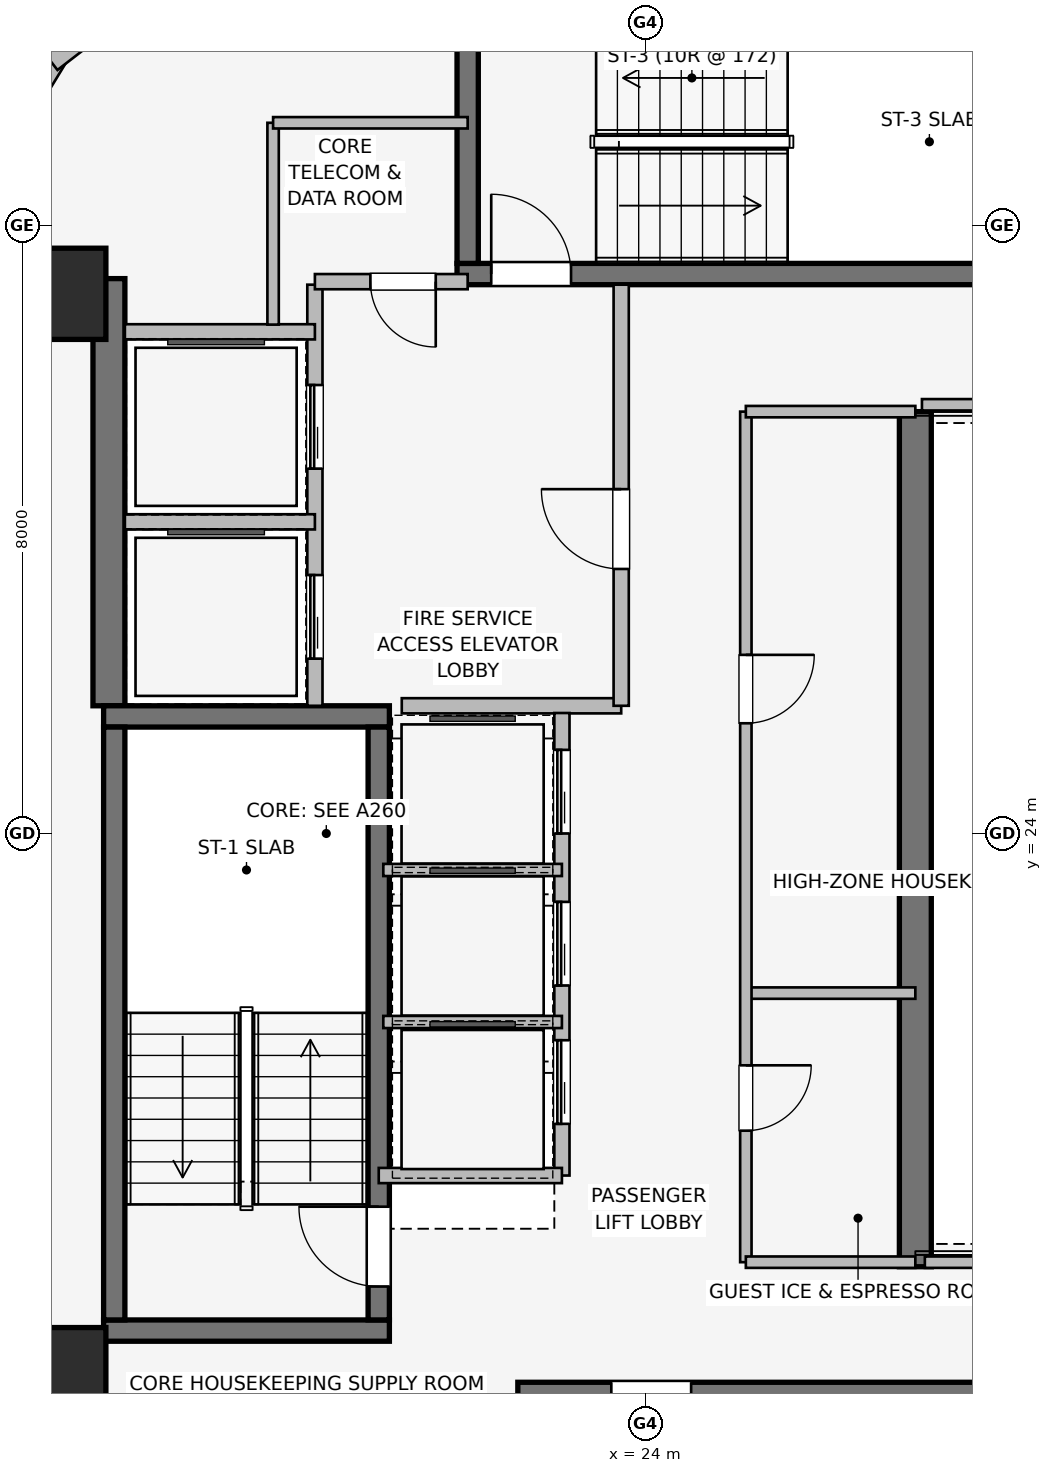
"""IFC4 building model, lengths in metres.
Left out: names, types, materials, properties, quantities, classifications, styles, units other than length and angle.
Written with IfcOpenShell. Run it as: python <this file> out.ifc"""

import sys

from ifc_helpers import new_model, si_unit, direction, frame, frame_2d, origin, origin_2d, place, context, subcontext, project, spatial, rectangle, extrude, element, fill, save


model = new_model("IFC4")
c1 = context("Model", 3, precision=1e-05, world=origin(), true_north=direction((0.0, 1.0)))
c2 = subcontext(c1, "Body", "Model", "MODEL_VIEW")
j1 = project(units=[si_unit("LENGTHUNIT", "METRE"), si_unit("PLANEANGLEUNIT", "RADIAN")], contexts=[c1])
p1 = place(None, origin())
s1 = spatial("IfcSite", under=j1, at=p1, CompositionType="ELEMENT")
p2 = place(p1, origin())
s2 = spatial("IfcBuilding", under=s1, at=p2, CompositionType="ELEMENT")
p3 = place(p2, frame((0.0, 0.0, 213.7)))
s3 = spatial("IfcBuildingStorey", under=s2, at=p3, CompositionType="ELEMENT", Elevation=213.7)
p4 = place(p3, frame((16.94, 25.68, 0.0), z_axis=(0.0, 0.0, 1.0), x_axis=(0.0, 1.0, 0.0)))
e1 = element("IfcWall", 1, at=p4, inside=s3, PredefinedType="SHEAR", context=c2, shape_type="SweptSolid", body=[
    extrude(rectangle(XDim=5.62, YDim=0.42, at=frame_2d((2.81, 0.0))), origin(), (0.0, 0.0, 1.0), 3.45),
])
p5 = place(p3, frame((27.55, 29.55, 0.0), z_axis=(0.0, 0.0, 1.0), x_axis=(0.0, -1.0, 0.0)))
e2 = element("IfcWall", 2, at=p5, inside=s3, PredefinedType="SHEAR", context=c2, shape_type="SweptSolid", body=[
    extrude(rectangle(XDim=11.25, YDim=0.42, at=frame_2d((5.625, 0.0))), origin(), (0.0, 0.0, 1.0), 3.45),
])
for number, where, z_axis, x_axis in (
    (3, (16.87, 17.46, 0.0), (0.0, 0.0, 1.0), (1.0, 0.0, 0.0)),
    (4, (20.63, 25.54, 0.0), (0.0, 0.0, 1.0), (-1.0, 0.0, 0.0)),
):
    element("IfcWall", number, at=place(p3, frame(where, z_axis=z_axis, x_axis=x_axis)), inside=s3, PredefinedType="SHEAR", context=c2, shape_type="SweptSolid", body=[
        extrude(rectangle(XDim=3.76, YDim=0.28, at=frame_2d((1.88, 0.0))), origin(), (0.0, 0.0, 1.0), 3.45),
    ])
p6 = place(p3, frame((17.01, 25.4, 0.0), z_axis=(0.0, 0.0, 1.0), x_axis=(0.0, -1.0, 0.0)))
e5 = element("IfcWall", 5, at=p6, inside=s3, PredefinedType="SHEAR", context=c2, shape_type="SweptSolid", body=[
    extrude(rectangle(XDim=7.8, YDim=0.28, at=frame_2d((3.9, 0.0))), origin(), (0.0, 0.0, 1.0), 3.45),
])
p7 = place(p3, frame((20.49, 17.6, 0.0), z_axis=(0.0, 0.0, 1.0), x_axis=(0.0, 1.0, 0.0)))
e6 = element("IfcWall", 6, at=p7, inside=s3, PredefinedType="SHEAR", context=c2, shape_type="SweptSolid", body=[
    extrude(rectangle(XDim=7.8, YDim=0.28, at=frame_2d((3.9, 0.0))), origin(), (0.0, 0.0, 1.0), 3.45),
])
p8 = place(p7, frame((0.44, 0.0, 0.0)))
e7 = element("IfcOpeningElement", 7, at=p8, cuts=e6, PredefinedType="OPENING", context=c2, shape_type="SweptSolid", body=[
    extrude(rectangle(XDim=1.05, YDim=2.0, at=frame_2d((0.525, 1.0))), frame((0.0, 0.15, 0.0), z_axis=(0.0, -1.0, 0.0), x_axis=(1.0, 0.0, 0.0)), (0.0, 0.0, 1.0), 0.3),
])
p9 = place(p3, frame((30.68, 16.64, 0.0), z_axis=(0.0, 0.0, 1.0), x_axis=(-1.0, 0.0, 0.0)))
e8 = element("IfcWall", 8, at=p9, inside=s3, PredefinedType="SHEAR", context=c2, shape_type="SweptSolid", body=[
    extrude(rectangle(XDim=8.36, YDim=0.28, at=frame_2d((4.18, 0.0))), origin(), (0.0, 0.0, 1.0), 3.45),
])
p10 = place(p9, frame((6.08, 0.0, 0.0)))
e9 = element("IfcOpeningElement", 9, at=p10, cuts=e8, PredefinedType="OPENING", context=c2, shape_type="SweptSolid", body=[
    extrude(rectangle(XDim=1.05, YDim=2.0, at=frame_2d((0.525, 1.0))), frame((0.0, 0.15, 0.0), z_axis=(0.0, -1.0, 0.0), x_axis=(1.0, 0.0, 0.0)), (0.0, 0.0, 1.0), 0.3),
])
p11 = place(p3, frame((21.52, 31.36, 0.0), z_axis=(0.0, 0.0, 1.0), x_axis=(1.0, 0.0, 0.0)))
e10 = element("IfcWall", 10, at=p11, inside=s3, PredefinedType="SHEAR", context=c2, shape_type="SweptSolid", body=[
    extrude(rectangle(XDim=8.36, YDim=0.28, at=frame_2d((4.18, 0.0))), origin(), (0.0, 0.0, 1.0), 3.45),
])
p12 = place(p11, frame((0.45, 0.0, 0.0)))
e11 = element("IfcOpeningElement", 11, at=p12, cuts=e10, PredefinedType="OPENING", context=c2, shape_type="SweptSolid", body=[
    extrude(rectangle(XDim=1.05, YDim=2.0, at=frame_2d((0.525, 1.0))), frame((0.0, 0.15, 0.0), z_axis=(0.0, -1.0, 0.0), x_axis=(1.0, 0.0, 0.0)), (0.0, 0.0, 1.0), 0.3),
])
p13 = place(p3, frame((21.66, 34.7, 0.0), z_axis=(0.0, 0.0, 1.0), x_axis=(0.0, -1.0, 0.0)))
e12 = element("IfcWall", 12, at=p13, inside=s3, PredefinedType="SHEAR", context=c2, shape_type="SweptSolid", body=[
    extrude(rectangle(XDim=3.2, YDim=0.28, at=frame_2d((1.6, 0.0))), origin(), (0.0, 0.0, 1.0), 3.45),
])
for number, where, z_axis, x_axis in (
    (13, (16.3, 16.9, 0.0), (0.0, 0.0, 1.0), (1.0, 0.0, 0.0)),
    (14, (16.3, 31.1, 0.0), (0.0, 0.0, 1.0), (1.0, 0.0, 0.0)),
):
    element("IfcColumn", number, at=place(p3, frame(where, z_axis=z_axis, x_axis=x_axis)), inside=s3, PredefinedType="COLUMN", context=c2, shape_type="SweptSolid", body=[
        extrude(rectangle(XDim=1.2, YDim=1.2, at=origin_2d()), origin(), (0.0, 0.0, 1.0), 3.45),
    ])
p14 = place(p3, frame((15.415, 32.882, 0.0), z_axis=(0.0, 0.0, 1.0), x_axis=(0.520325409202, 0.853968072318, 0.0)))
e15 = element("IfcWall", 15, at=p14, inside=s3, PredefinedType="STANDARD", context=c2, shape_type="SweptSolid", body=[
    extrude(rectangle(XDim=1.678, YDim=0.33, at=frame_2d((0.839, 0.0))), origin(), (0.0, 0.0, 1.0), 3.19),
])
p15 = place(p3, frame((16.162, 34.175, 0.0), z_axis=(0.0, 0.0, 1.0), x_axis=(0.791409877269, 0.611285862884, 0.0)))
e16 = element("IfcWall", 16, at=p15, inside=s3, PredefinedType="STANDARD", context=c2, shape_type="SweptSolid", body=[
    extrude(rectangle(XDim=1.677, YDim=0.33, at=frame_2d((0.838, 0.0))), origin(), (0.0, 0.0, 1.0), 3.19),
])
p16 = place(p3, frame((19.65, 25.68, 0.0), z_axis=(0.0, 0.0, 1.0), x_axis=(0.0, 1.0, 0.0)))
e17 = element("IfcWall", 17, at=p16, inside=s3, PredefinedType="PARTITIONING", context=c2, shape_type="SweptSolid", body=[
    extrude(rectangle(XDim=5.54, YDim=0.2, at=frame_2d((2.77, 0.0))), origin(), (0.0, 0.0, 1.0), 3.19),
])
p17 = place(p16, frame((0.62, 0.0, 0.0)))
e18 = element("IfcOpeningElement", 18, at=p17, cuts=e17, PredefinedType="OPENING", context=c2, shape_type="SweptSolid", body=[
    extrude(rectangle(XDim=1.1, YDim=2.2, at=frame_2d((0.55, 1.1))), frame((0.0, 0.11, 0.0), z_axis=(0.0, -1.0, 0.0), x_axis=(1.0, 0.0, 0.0)), (0.0, 0.0, 1.0), 0.22),
])
p18 = place(p16, frame((3.12, 0.0, 0.0)))
e19 = element("IfcOpeningElement", 19, at=p18, cuts=e17, PredefinedType="OPENING", context=c2, shape_type="SweptSolid", body=[
    extrude(rectangle(XDim=1.1, YDim=2.2, at=frame_2d((0.55, 1.1))), frame((0.0, 0.11, 0.0), z_axis=(0.0, -1.0, 0.0), x_axis=(1.0, 0.0, 0.0)), (0.0, 0.0, 1.0), 0.22),
])
p19 = place(p3, frame((20.793, 25.68, 0.0), z_axis=(0.0, 0.0, 1.0), x_axis=(1.0, 0.0, 0.0)))
e20 = element("IfcWall", 20, at=p19, inside=s3, PredefinedType="PARTITIONING", context=c2, shape_type="SweptSolid", body=[
    extrude(rectangle(XDim=2.887, YDim=0.2, at=frame_2d((1.443, 0.0))), origin(), (0.0, 0.0, 1.0), 3.19),
])
p20 = place(p3, frame((23.68, 25.68, 0.0), z_axis=(0.0, 0.0, 1.0), x_axis=(0.0, 1.0, 0.0)))
e21 = element("IfcWall", 21, at=p20, inside=s3, PredefinedType="PARTITIONING", context=c2, shape_type="SweptSolid", body=[
    extrude(rectangle(XDim=5.54, YDim=0.2, at=frame_2d((2.77, 0.0))), origin(), (0.0, 0.0, 1.0), 3.19),
])
p21 = place(p20, frame((1.8, 0.0, 0.0)))
e22 = element("IfcOpeningElement", 22, at=p21, cuts=e21, PredefinedType="OPENING", context=c2, shape_type="SweptSolid", body=[
    extrude(rectangle(XDim=1.05, YDim=2.0, at=frame_2d((0.525, 1.0))), frame((0.0, 0.11, 0.0), z_axis=(0.0, -1.0, 0.0), x_axis=(1.0, 0.0, 0.0)), (0.0, 0.0, 1.0), 0.22),
])
p22 = place(p3, frame((21.66, 31.26, 0.0), z_axis=(0.0, 0.0, 1.0), x_axis=(-1.0, 0.0, 0.0)))
e23 = element("IfcWall", 23, at=p22, inside=s3, PredefinedType="PARTITIONING", context=c2, shape_type="SweptSolid", body=[
    extrude(rectangle(XDim=2.01, YDim=0.2, at=frame_2d((1.005, 0.0))), origin(), (0.0, 0.0, 1.0), 3.19),
])
p23 = place(p22, frame((0.42, 0.0, 0.0)))
e24 = element("IfcOpeningElement", 24, at=p23, cuts=e23, PredefinedType="OPENING", context=c2, shape_type="SweptSolid", body=[
    extrude(rectangle(XDim=0.86, YDim=2.0, at=frame_2d((0.43, 1.0))), frame((0.0, 0.11, 0.0), z_axis=(0.0, -1.0, 0.0), x_axis=(1.0, 0.0, 0.0)), (0.0, 0.0, 1.0), 0.22),
])
p24 = place(p3, frame((17.15, 28.1, 0.0), z_axis=(0.0, 0.0, 1.0), x_axis=(1.0, 0.0, 0.0)))
e25 = element("IfcWall", 25, at=p24, inside=s3, PredefinedType="PARTITIONING", context=c2, shape_type="SweptSolid", body=[
    extrude(rectangle(XDim=2.5, YDim=0.2, at=frame_2d((1.25, 0.0))), origin(), (0.0, 0.0, 1.0), 3.19),
])
p25 = place(p3, frame((19.65, 30.6, 0.0), z_axis=(0.0, 0.0, 1.0), x_axis=(-1.0, 0.0, 0.0)))
e26 = element("IfcWall", 26, at=p25, inside=s3, PredefinedType="PARTITIONING", context=c2, shape_type="SweptSolid", body=[
    extrude(rectangle(XDim=2.5, YDim=0.2, at=frame_2d((1.25, 0.0))), origin(), (0.0, 0.0, 1.0), 2.09),
])
p26 = place(p3, frame((22.9, 19.5, 0.0), z_axis=(0.0, 0.0, 1.0), x_axis=(0.0, 1.0, 0.0)))
e27 = element("IfcWall", 27, at=p26, inside=s3, PredefinedType="PARTITIONING", context=c2, shape_type="SweptSolid", body=[
    extrude(rectangle(XDim=6.085, YDim=0.2, at=frame_2d((3.042, 0.0))), origin(), (0.0, 0.0, 1.0), 3.19),
])
p27 = place(p26, frame((0.68, 0.0, 0.0)))
e28 = element("IfcOpeningElement", 28, at=p27, cuts=e27, PredefinedType="OPENING", context=c2, shape_type="SweptSolid", body=[
    extrude(rectangle(XDim=1.1, YDim=2.2, at=frame_2d((0.55, 1.1))), frame((0.0, 0.11, 0.0), z_axis=(0.0, -1.0, 0.0), x_axis=(1.0, 0.0, 0.0)), (0.0, 0.0, 1.0), 0.22),
])
p28 = place(p26, frame((2.5, 0.0, 0.0)))
e29 = element("IfcOpeningElement", 29, at=p28, cuts=e27, PredefinedType="OPENING", context=c2, shape_type="SweptSolid", body=[
    extrude(rectangle(XDim=1.1, YDim=2.2, at=frame_2d((0.55, 1.1))), frame((0.0, 0.11, 0.0), z_axis=(0.0, -1.0, 0.0), x_axis=(1.0, 0.0, 0.0)), (0.0, 0.0, 1.0), 0.22),
])
p29 = place(p26, frame((4.5, 0.0, 0.0)))
e30 = element("IfcOpeningElement", 30, at=p29, cuts=e27, PredefinedType="OPENING", context=c2, shape_type="SweptSolid", body=[
    extrude(rectangle(XDim=1.1, YDim=2.2, at=frame_2d((0.55, 1.1))), frame((0.0, 0.11, 0.0), z_axis=(0.0, -1.0, 0.0), x_axis=(1.0, 0.0, 0.0)), (0.0, 0.0, 1.0), 0.22),
])
p30 = place(p3, frame((20.49, 19.5, 0.0), z_axis=(0.0, 0.0, 1.0), x_axis=(1.0, 0.0, 0.0)))
e31 = element("IfcWall", 31, at=p30, inside=s3, PredefinedType="PARTITIONING", context=c2, shape_type="SweptSolid", body=[
    extrude(rectangle(XDim=2.41, YDim=0.2, at=frame_2d((1.205, 0.0))), origin(), (0.0, 0.0, 1.0), 2.09),
])
for number, where, z_axis, x_axis in (
    (32, (20.55, 21.52, 0.0), (0.0, 0.0, 1.0), (1.0, 0.0, 0.0)),
    (33, (20.55, 23.52, 0.0), (0.0, 0.0, 1.0), (1.0, 0.0, 0.0)),
):
    element("IfcWall", number, at=place(p3, frame(where, z_axis=z_axis, x_axis=x_axis)), inside=s3, PredefinedType="PARTITIONING", context=c2, shape_type="SweptSolid", body=[
        extrude(rectangle(XDim=2.35, YDim=0.16, at=frame_2d((1.175, 0.0))), origin(), (0.0, 0.0, 1.0), 3.19),
    ])
p31 = place(p3, frame((25.32, 21.9, 0.0), z_axis=(0.0, 0.0, 1.0), x_axis=(1.0, 0.0, 0.0)))
e34 = element("IfcWall", 34, at=p31, inside=s3, PredefinedType="PARTITIONING", context=c2, shape_type="SweptSolid", body=[
    extrude(rectangle(XDim=2.23, YDim=0.15, at=frame_2d((1.115, 0.0))), origin(), (0.0, 0.0, 1.0), 3.19),
])
p32 = place(p3, frame((25.32, 29.55, 0.0), z_axis=(0.0, 0.0, 1.0), x_axis=(0.0, -1.0, 0.0)))
e35 = element("IfcWall", 35, at=p32, inside=s3, PredefinedType="PARTITIONING", context=c2, shape_type="SweptSolid", body=[
    extrude(rectangle(XDim=11.19, YDim=0.15, at=frame_2d((5.595, 0.0))), origin(), (0.0, 0.0, 1.0), 3.19),
])
p33 = place(p32, frame((3.2, 0.0, 0.0)))
e36 = element("IfcOpeningElement", 36, at=p33, cuts=e35, PredefinedType="OPENING", context=c2, shape_type="SweptSolid", body=[
    extrude(rectangle(XDim=0.9, YDim=2.0, at=frame_2d((0.45, 1.0))), frame((0.0, 0.085, 0.0), z_axis=(0.0, -1.0, 0.0), x_axis=(1.0, 0.0, 0.0)), (0.0, 0.0, 1.0), 0.17),
])
p34 = place(p32, frame((8.6, 0.0, 0.0)))
e37 = element("IfcOpeningElement", 37, at=p34, cuts=e35, PredefinedType="OPENING", context=c2, shape_type="SweptSolid", body=[
    extrude(rectangle(XDim=0.86, YDim=2.0, at=frame_2d((0.43, 1.0))), frame((0.0, 0.085, 0.0), z_axis=(0.0, -1.0, 0.0), x_axis=(1.0, 0.0, 0.0)), (0.0, 0.0, 1.0), 0.17),
])
p35 = place(p3, frame((25.32, 18.36, 0.0), z_axis=(0.0, 0.0, 1.0), x_axis=(1.0, 0.0, 0.0)))
e38 = element("IfcWall", 38, at=p35, inside=s3, PredefinedType="PARTITIONING", context=c2, shape_type="SweptSolid", body=[
    extrude(rectangle(XDim=2.23, YDim=0.15, at=frame_2d((1.115, 0.0))), origin(), (0.0, 0.0, 1.0), 3.19),
])
p36 = place(p3, frame((27.55, 29.55, 0.0), z_axis=(0.0, 0.0, 1.0), x_axis=(-1.0, 0.0, 0.0)))
e39 = element("IfcWall", 39, at=p36, inside=s3, PredefinedType="PARTITIONING", context=c2, shape_type="SweptSolid", body=[
    extrude(rectangle(XDim=2.23, YDim=0.15, at=frame_2d((1.115, 0.0))), origin(), (0.0, 0.0, 1.0), 2.09),
])
p37 = place(p3, frame((19.1, 33.35, 0.0), z_axis=(0.0, 0.0, 1.0), x_axis=(0.0, -1.0, 0.0)))
e40 = element("IfcWall", 40, at=p37, inside=s3, PredefinedType="PARTITIONING", context=c2, shape_type="SweptSolid", body=[
    extrude(rectangle(XDim=2.655, YDim=0.15, at=frame_2d((1.328, 0.0))), origin(), (0.0, 0.0, 1.0), 3.19),
])
p38 = place(p3, frame((21.66, 33.35, 0.0), z_axis=(0.0, 0.0, 1.0), x_axis=(-1.0, 0.0, 0.0)))
e41 = element("IfcWall", 41, at=p38, inside=s3, PredefinedType="PARTITIONING", context=c2, shape_type="SweptSolid", body=[
    extrude(rectangle(XDim=2.56, YDim=0.15, at=frame_2d((1.28, 0.0))), origin(), (0.0, 0.0, 1.0), 3.19),
])
p39 = place(p3, frame((27.675, 18.36, 0.0), z_axis=(0.0, 0.0, 1.0), x_axis=(1.0, 0.0, 0.0)))
e42 = element("IfcWall", 42, at=p39, inside=s3, PredefinedType="PARTITIONING", context=c2, shape_type="SweptSolid", body=[
    extrude(rectangle(XDim=12.165, YDim=0.15, at=frame_2d((6.083, 0.0))), origin(), (0.0, 0.0, 1.0), 2.331),
])
p40 = place(p3, frame((39.84, 29.64, 0.0), z_axis=(0.0, 0.0, 1.0), x_axis=(-1.0, 0.0, 0.0)))
e43 = element("IfcWall", 43, at=p40, inside=s3, PredefinedType="PARTITIONING", context=c2, shape_type="SweptSolid", body=[
    extrude(rectangle(XDim=12.203, YDim=0.15, at=frame_2d((6.102, 0.0))), origin(), (0.0, 0.0, 1.0), 2.331),
])
p41 = place(p8, origin())
e44 = element("IfcDoor", 44, at=p41, inside=s3, OperationType="SINGLE_SWING_RIGHT", PredefinedType="DOOR", context=c2, shape_type="SweptSolid", body=[
    extrude(rectangle(XDim=1.05, YDim=2.0, at=frame_2d((0.525, 1.0))), frame((0.0, 0.025, 0.0), z_axis=(0.0, -1.0, 0.0), x_axis=(1.0, 0.0, 0.0)), (0.0, 0.0, 1.0), 0.05),
])
fill(e7, e44)
p42 = place(p10, origin())
e45 = element("IfcDoor", 45, at=p42, inside=s3, OperationType="SINGLE_SWING_RIGHT", PredefinedType="DOOR", context=c2, shape_type="SweptSolid", body=[
    extrude(rectangle(XDim=1.05, YDim=2.0, at=frame_2d((0.525, 1.0))), frame((0.0, 0.025, 0.0), z_axis=(0.0, -1.0, 0.0), x_axis=(1.0, 0.0, 0.0)), (0.0, 0.0, 1.0), 0.05),
])
fill(e9, e45)
p43 = place(p12, origin())
e46 = element("IfcDoor", 46, at=p43, inside=s3, OperationType="SINGLE_SWING_LEFT", PredefinedType="DOOR", context=c2, shape_type="SweptSolid", body=[
    extrude(rectangle(XDim=1.05, YDim=2.0, at=frame_2d((0.525, 1.0))), frame((0.0, 0.025, 0.0), z_axis=(0.0, -1.0, 0.0), x_axis=(1.0, 0.0, 0.0)), (0.0, 0.0, 1.0), 0.05),
])
fill(e11, e46)
p44 = place(p17, origin())
e47 = element("IfcDoor", 47, at=p44, inside=s3, OperationType="SLIDING_TO_LEFT", PredefinedType="DOOR", context=c2, shape_type="SweptSolid", body=[
    extrude(rectangle(XDim=1.1, YDim=2.2, at=frame_2d((0.55, 1.1))), frame((0.0, 0.025, 0.0), z_axis=(0.0, -1.0, 0.0), x_axis=(1.0, 0.0, 0.0)), (0.0, 0.0, 1.0), 0.05),
])
fill(e18, e47)
p45 = place(p18, origin())
e48 = element("IfcDoor", 48, at=p45, inside=s3, OperationType="SLIDING_TO_LEFT", PredefinedType="DOOR", context=c2, shape_type="SweptSolid", body=[
    extrude(rectangle(XDim=1.1, YDim=2.2, at=frame_2d((0.55, 1.1))), frame((0.0, 0.025, 0.0), z_axis=(0.0, -1.0, 0.0), x_axis=(1.0, 0.0, 0.0)), (0.0, 0.0, 1.0), 0.05),
])
fill(e19, e48)
p46 = place(p21, origin())
e49 = element("IfcDoor", 49, at=p46, inside=s3, OperationType="SINGLE_SWING_RIGHT", PredefinedType="DOOR", context=c2, shape_type="SweptSolid", body=[
    extrude(rectangle(XDim=1.05, YDim=2.0, at=frame_2d((0.525, 1.0))), frame((0.0, 0.025, 0.0), z_axis=(0.0, -1.0, 0.0), x_axis=(1.0, 0.0, 0.0)), (0.0, 0.0, 1.0), 0.05),
])
fill(e22, e49)
p47 = place(p23, origin())
e50 = element("IfcDoor", 50, at=p47, inside=s3, OperationType="SINGLE_SWING_LEFT", PredefinedType="DOOR", context=c2, shape_type="SweptSolid", body=[
    extrude(rectangle(XDim=0.86, YDim=2.0, at=frame_2d((0.43, 1.0))), frame((0.0, 0.025, 0.0), z_axis=(0.0, -1.0, 0.0), x_axis=(1.0, 0.0, 0.0)), (0.0, 0.0, 1.0), 0.05),
])
fill(e24, e50)
p48 = place(p27, origin())
e51 = element("IfcDoor", 51, at=p48, inside=s3, OperationType="SLIDING_TO_LEFT", PredefinedType="DOOR", context=c2, shape_type="SweptSolid", body=[
    extrude(rectangle(XDim=1.1, YDim=2.2, at=frame_2d((0.55, 1.1))), frame((0.0, 0.025, 0.0), z_axis=(0.0, -1.0, 0.0), x_axis=(1.0, 0.0, 0.0)), (0.0, 0.0, 1.0), 0.05),
])
fill(e28, e51)
p49 = place(p28, origin())
e52 = element("IfcDoor", 52, at=p49, inside=s3, OperationType="SLIDING_TO_LEFT", PredefinedType="DOOR", context=c2, shape_type="SweptSolid", body=[
    extrude(rectangle(XDim=1.1, YDim=2.2, at=frame_2d((0.55, 1.1))), frame((0.0, 0.025, 0.0), z_axis=(0.0, -1.0, 0.0), x_axis=(1.0, 0.0, 0.0)), (0.0, 0.0, 1.0), 0.05),
])
fill(e29, e52)
p50 = place(p29, origin())
e53 = element("IfcDoor", 53, at=p50, inside=s3, OperationType="SLIDING_TO_LEFT", PredefinedType="DOOR", context=c2, shape_type="SweptSolid", body=[
    extrude(rectangle(XDim=1.1, YDim=2.2, at=frame_2d((0.55, 1.1))), frame((0.0, 0.025, 0.0), z_axis=(0.0, -1.0, 0.0), x_axis=(1.0, 0.0, 0.0)), (0.0, 0.0, 1.0), 0.05),
])
fill(e30, e53)
p51 = place(p33, origin())
e54 = element("IfcDoor", 54, at=p51, inside=s3, OperationType="SINGLE_SWING_LEFT", PredefinedType="DOOR", context=c2, shape_type="SweptSolid", body=[
    extrude(rectangle(XDim=0.9, YDim=2.0, at=frame_2d((0.45, 1.0))), frame((0.0, 0.025, 0.0), z_axis=(0.0, -1.0, 0.0), x_axis=(1.0, 0.0, 0.0)), (0.0, 0.0, 1.0), 0.05),
])
fill(e36, e54)
p52 = place(p34, origin())
e55 = element("IfcDoor", 55, at=p52, inside=s3, OperationType="SINGLE_SWING_LEFT", PredefinedType="DOOR", context=c2, shape_type="SweptSolid", body=[
    extrude(rectangle(XDim=0.86, YDim=2.0, at=frame_2d((0.43, 1.0))), frame((0.0, 0.025, 0.0), z_axis=(0.0, -1.0, 0.0), x_axis=(1.0, 0.0, 0.0)), (0.0, 0.0, 1.0), 0.05),
])
fill(e37, e55)
save(model, sys.argv[1])
